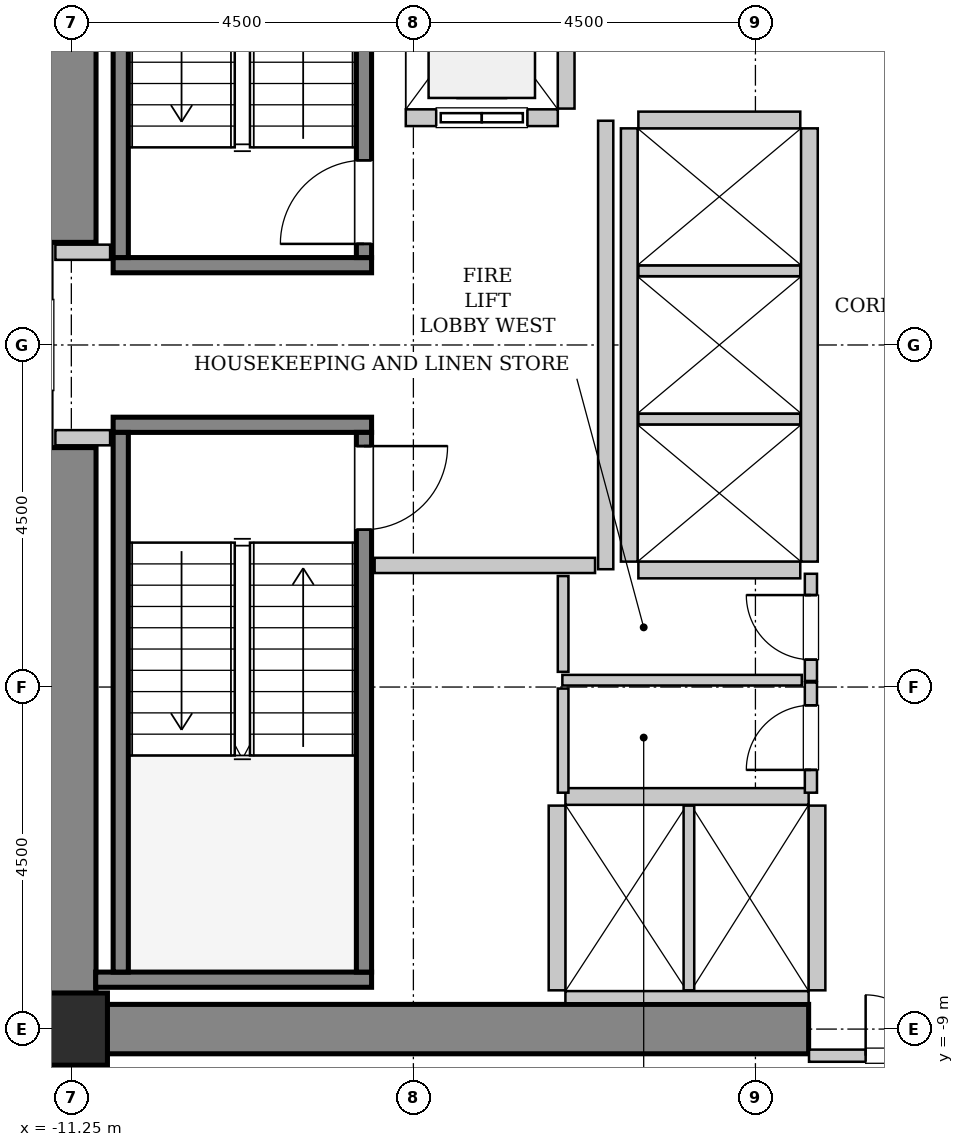
"""IFC4 building model, lengths in metres.
Left out: names, types, materials, properties, quantities, classifications, styles, units other than length and angle.
Written with IfcOpenShell. Run it as: python <this file> out.ifc"""

import sys

from ifc_helpers import new_model, si_unit, direction, frame, frame_2d, origin, origin_2d, place, context, subcontext, project, spatial, rectangle, hollow_rectangle, extrude, source, transform, mapped, element, fill, save


model = new_model("IFC4")
c1 = context("Model", 3, precision=1e-05, world=origin(), true_north=direction((0.0, 1.0)))
c2 = subcontext(c1, "Body", "Model", "MODEL_VIEW")
j1 = project(units=[si_unit("LENGTHUNIT", "METRE"), si_unit("PLANEANGLEUNIT", "RADIAN")], contexts=[c1])
p1 = place(None, origin())
s1 = spatial("IfcSite", under=j1, at=p1, CompositionType="ELEMENT")
p2 = place(p1, origin())
s2 = spatial("IfcBuilding", under=s1, at=p2, CompositionType="ELEMENT")
p3 = place(p2, frame((0.0, 0.0, 74.8)))
s3 = spatial("IfcBuildingStorey", under=s2, at=p3, CompositionType="ELEMENT", Elevation=74.8)
m1 = source(origin(), c2, "Body", "SweptSolid", [
    extrude(rectangle(XDim=10.025, YDim=0.65, at=frame_2d((5.012, 0.0))), origin(), (0.0, 0.0, 1.0), 3.8),
])
p4 = place(p3, frame((-11.575, -9.0, 0.0), z_axis=(0.0, 0.0, 1.0), x_axis=(1.0, 0.0, 0.0)))
e1 = element("IfcWall", 1, at=p4, inside=s3, PredefinedType="SHEAR", context=c2, shape_type="MappedRepresentation", body=[
    mapped(m1, transform((0.0, 0.0, 0.0), x_axis=(1.0, 0.0, 0.0), y_axis=(0.0, 1.0, 0.0), z_axis=(0.0, 0.0, 1.0), scale=1.0)),
])
m2 = source(origin(), c2, "Body", "SweptSolid", [
    extrude(rectangle(XDim=7.325, YDim=0.65, at=frame_2d((3.663, 0.0))), origin(), (0.0, 0.0, 1.0), 3.8),
])
for number, where, z_axis, x_axis in (
    (2, (-11.25, -8.675, 0.0), (0.0, 0.0, 1.0), (0.0, 1.0, 0.0)),
    (3, (-11.25, 1.35, 0.0), (0.0, 0.0, 1.0), (0.0, 1.0, 0.0)),
):
    element("IfcWall", number, at=place(p3, frame(where, z_axis=z_axis, x_axis=x_axis)), inside=s3, PredefinedType="SHEAR", context=c2, shape_type="MappedRepresentation", body=[
        mapped(m2, transform((0.0, 0.0, 0.0), x_axis=(1.0, 0.0, 0.0), y_axis=(0.0, 1.0, 0.0), z_axis=(0.0, 0.0, 1.0), scale=1.0)),
    ])
m3 = source(origin(), c2, "Body", "SweptSolid", [
    extrude(hollow_rectangle(XDim=0.95, YDim=0.95, WallThickness=0.045, InnerFilletRadius=0.045, OuterFilletRadius=0.09, at=origin_2d()), origin(), (0.0, 0.0, 1.0), 3.8),
])
p5 = place(p3, frame((-11.25, -9.0, 0.0), z_axis=(0.0, 0.0, 1.0), x_axis=(1.0, 0.0, 0.0)))
e4 = element("IfcColumn", 4, at=p5, inside=s3, PredefinedType="COLUMN", context=c2, shape_type="MappedRepresentation", body=[
    mapped(m3, transform((0.0, 0.0, 0.0), x_axis=(1.0, 0.0, 0.0), y_axis=(0.0, 1.0, 0.0), z_axis=(0.0, 0.0, 1.0), scale=1.0)),
])
m4 = source(origin(), c2, "Body", "SweptSolid", [
    extrude(rectangle(XDim=3.4, YDim=0.2, at=frame_2d((1.7, 0.0))), origin(), (0.0, 0.0, 1.0), 3.8),
])
p6 = place(p3, frame((-7.3, 1.05, 0.0), z_axis=(0.0, 0.0, 1.0), x_axis=(-1.0, 0.0, 0.0)))
e5 = element("IfcWall", 5, at=p6, inside=s3, PredefinedType="SOLIDWALL", context=c2, shape_type="MappedRepresentation", body=[
    mapped(m4, transform((0.0, 0.0, 0.0), x_axis=(1.0, 0.0, 0.0), y_axis=(0.0, 1.0, 0.0), z_axis=(0.0, 0.0, 1.0), scale=1.0)),
])
m5 = source(origin(), c2, "Body", "SweptSolid", [
    extrude(rectangle(XDim=7.1, YDim=0.2, at=frame_2d((3.55, 0.0))), origin(), (0.0, 0.0, 1.0), 3.8),
])
p7 = place(p3, frame((-7.4, 1.15, 0.0), z_axis=(0.0, 0.0, 1.0), x_axis=(0.0, 1.0, 0.0)))
e6 = element("IfcWall", 6, at=p7, inside=s3, PredefinedType="SOLIDWALL", context=c2, shape_type="MappedRepresentation", body=[
    mapped(m5, transform((0.0, 0.0, 0.0), x_axis=(1.0, 0.0, 0.0), y_axis=(0.0, 1.0, 0.0), z_axis=(0.0, 0.0, 1.0), scale=1.0)),
])
p8 = place(p7, frame((0.18, 0.0, 0.0)))
e7 = element("IfcOpeningElement", 7, at=p8, cuts=e6, PredefinedType="OPENING", context=c2, shape_type="SweptSolid", body=[
    extrude(rectangle(XDim=1.1, YDim=2.15, at=frame_2d((0.55, 1.075))), frame((0.0, 0.11, 0.0), z_axis=(0.0, -1.0, 0.0), x_axis=(1.0, 0.0, 0.0)), (0.0, 0.0, 1.0), 0.22),
])
p9 = place(p3, frame((-10.6, 1.15, 0.0), z_axis=(0.0, 0.0, 1.0), x_axis=(0.0, 1.0, 0.0)))
e8 = element("IfcWall", 8, at=p9, inside=s3, PredefinedType="SOLIDWALL", context=c2, shape_type="MappedRepresentation", body=[
    mapped(m5, transform((0.0, 0.0, 0.0), x_axis=(1.0, 0.0, 0.0), y_axis=(0.0, 1.0, 0.0), z_axis=(0.0, 0.0, 1.0), scale=1.0)),
])
p10 = place(p3, frame((-10.7, -1.05, 0.0), z_axis=(0.0, 0.0, 1.0), x_axis=(1.0, 0.0, 0.0)))
e9 = element("IfcWall", 9, at=p10, inside=s3, PredefinedType="SOLIDWALL", context=c2, shape_type="MappedRepresentation", body=[
    mapped(m4, transform((0.0, 0.0, 0.0), x_axis=(1.0, 0.0, 0.0), y_axis=(0.0, 1.0, 0.0), z_axis=(0.0, 0.0, 1.0), scale=1.0)),
])
m6 = source(origin(), c2, "Body", "SweptSolid", [
    extrude(rectangle(XDim=3.63, YDim=0.2, at=frame_2d((1.815, 0.0))), origin(), (0.0, 0.0, 1.0), 3.8),
])
p11 = place(p3, frame((-10.93, -8.35, 0.0), z_axis=(0.0, 0.0, 1.0), x_axis=(1.0, 0.0, 0.0)))
e10 = element("IfcWall", 10, at=p11, inside=s3, PredefinedType="SOLIDWALL", context=c2, shape_type="MappedRepresentation", body=[
    mapped(m6, transform((0.0, 0.0, 0.0), x_axis=(1.0, 0.0, 0.0), y_axis=(0.0, 1.0, 0.0), z_axis=(0.0, 0.0, 1.0), scale=1.0)),
])
p12 = place(p3, frame((-10.6, -1.15, 0.0), z_axis=(0.0, 0.0, 1.0), x_axis=(0.0, -1.0, 0.0)))
e11 = element("IfcWall", 11, at=p12, inside=s3, PredefinedType="SOLIDWALL", context=c2, shape_type="MappedRepresentation", body=[
    mapped(m5, transform((0.0, 0.0, 0.0), x_axis=(1.0, 0.0, 0.0), y_axis=(0.0, 1.0, 0.0), z_axis=(0.0, 0.0, 1.0), scale=1.0)),
])
p13 = place(p3, frame((-7.4, -1.15, 0.0), z_axis=(0.0, 0.0, 1.0), x_axis=(0.0, -1.0, 0.0)))
e12 = element("IfcWall", 12, at=p13, inside=s3, PredefinedType="SOLIDWALL", context=c2, shape_type="MappedRepresentation", body=[
    mapped(m5, transform((0.0, 0.0, 0.0), x_axis=(1.0, 0.0, 0.0), y_axis=(0.0, 1.0, 0.0), z_axis=(0.0, 0.0, 1.0), scale=1.0)),
])
p14 = place(p13, frame((0.18, 0.0, 0.0)))
e13 = element("IfcOpeningElement", 13, at=p14, cuts=e12, PredefinedType="OPENING", context=c2, shape_type="SweptSolid", body=[
    extrude(rectangle(XDim=1.1, YDim=2.15, at=frame_2d((0.55, 1.075))), frame((0.0, 0.11, 0.0), z_axis=(0.0, -1.0, 0.0), x_axis=(1.0, 0.0, 0.0)), (0.0, 0.0, 1.0), 0.22),
])
m7 = source(origin(), c2, "Body", "SweptSolid", [
    extrude(rectangle(XDim=2.0, YDim=0.22, at=frame_2d((1.0, 0.0))), origin(), (0.0, 0.0, 1.0), 3.535),
])
p15 = place(p3, frame((-6.85, 2.99, 0.0), z_axis=(0.0, 0.0, 1.0), x_axis=(1.0, 0.0, 0.0)))
e14 = element("IfcWall", 14, at=p15, inside=s3, PredefinedType="SOLIDWALL", context=c2, shape_type="MappedRepresentation", body=[
    mapped(m7, transform((0.0, 0.0, 0.0), x_axis=(1.0, 0.0, 0.0), y_axis=(0.0, 1.0, 0.0), z_axis=(0.0, 0.0, 1.0), scale=1.0)),
])
p16 = place(p15, frame((0.4, 0.0, 0.0)))
e15 = element("IfcOpeningElement", 15, at=p16, cuts=e14, PredefinedType="OPENING", context=c2, shape_type="SweptSolid", body=[
    extrude(rectangle(XDim=1.2, YDim=2.2, at=frame_2d((0.6, 1.1))), frame((0.0, 0.12, 0.0), z_axis=(0.0, -1.0, 0.0), x_axis=(1.0, 0.0, 0.0)), (0.0, 0.0, 1.0), 0.24),
])
m8 = source(origin(), c2, "Body", "SweptSolid", [
    extrude(rectangle(XDim=2.68, YDim=0.22, at=frame_2d((1.34, 0.0))), origin(), (0.0, 0.0, 1.0), 3.535),
])
p17 = place(p3, frame((-4.74, 3.11, 0.0), z_axis=(0.0, 0.0, 1.0), x_axis=(0.0, 1.0, 0.0)))
e16 = element("IfcWall", 16, at=p17, inside=s3, PredefinedType="SOLIDWALL", context=c2, shape_type="MappedRepresentation", body=[
    mapped(m8, transform((0.0, 0.0, 0.0), x_axis=(1.0, 0.0, 0.0), y_axis=(0.0, 1.0, 0.0), z_axis=(0.0, 0.0, 1.0), scale=1.0)),
])
m9 = source(origin(), c2, "Body", "SweptSolid", [
    extrude(rectangle(XDim=3.2, YDim=0.22, at=frame_2d((1.6, 0.0))), origin(), (0.0, 0.0, 1.0), 3.535),
])
p18 = place(p3, frame((-1.55, -5.94, 0.0), z_axis=(0.0, 0.0, 1.0), x_axis=(-1.0, 0.0, 0.0)))
e17 = element("IfcWall", 17, at=p18, inside=s3, PredefinedType="SOLIDWALL", context=c2, shape_type="MappedRepresentation", body=[
    mapped(m9, transform((0.0, 0.0, 0.0), x_axis=(1.0, 0.0, 0.0), y_axis=(0.0, 1.0, 0.0), z_axis=(0.0, 0.0, 1.0), scale=1.0)),
])
m10 = source(origin(), c2, "Body", "SweptSolid", [
    extrude(rectangle(XDim=3.2, YDim=0.16, at=frame_2d((1.6, 0.0))), origin(), (0.0, 0.0, 1.0), 2.425),
])
p19 = place(p3, frame((-4.75, -8.58, 0.0), z_axis=(0.0, 0.0, 1.0), x_axis=(1.0, 0.0, 0.0)))
e18 = element("IfcWall", 18, at=p19, inside=s3, PredefinedType="PARTITIONING", context=c2, shape_type="MappedRepresentation", body=[
    mapped(m10, transform((0.0, 0.0, 0.0), x_axis=(1.0, 0.0, 0.0), y_axis=(0.0, 1.0, 0.0), z_axis=(0.0, 0.0, 1.0), scale=1.0)),
])
m11 = source(origin(), c2, "Body", "SweptSolid", [
    extrude(rectangle(XDim=2.43, YDim=0.22, at=frame_2d((1.215, 0.0))), origin(), (0.0, 0.0, 1.0), 3.535),
])
p20 = place(p3, frame((-4.86, -6.06, 0.0), z_axis=(0.0, 0.0, 1.0), x_axis=(0.0, -1.0, 0.0)))
e19 = element("IfcWall", 19, at=p20, inside=s3, PredefinedType="SOLIDWALL", context=c2, shape_type="MappedRepresentation", body=[
    mapped(m11, transform((0.0, 0.0, 0.0), x_axis=(1.0, 0.0, 0.0), y_axis=(0.0, 1.0, 0.0), z_axis=(0.0, 0.0, 1.0), scale=1.0)),
])
m12 = source(origin(), c2, "Body", "SweptSolid", [
    extrude(rectangle(XDim=2.43, YDim=0.14, at=frame_2d((1.215, 0.0))), origin(), (0.0, 0.0, 1.0), 3.535),
])
p21 = place(p3, frame((-3.125, -8.49, 0.0), z_axis=(0.0, 0.0, 1.0), x_axis=(0.0, 1.0, 0.0)))
e20 = element("IfcWall", 20, at=p21, inside=s3, PredefinedType="PARTITIONING", context=c2, shape_type="MappedRepresentation", body=[
    mapped(m12, transform((0.0, 0.0, 0.0), x_axis=(1.0, 0.0, 0.0), y_axis=(0.0, 1.0, 0.0), z_axis=(0.0, 0.0, 1.0), scale=1.0)),
])
p22 = place(p3, frame((-1.44, -8.49, 0.0), z_axis=(0.0, 0.0, 1.0), x_axis=(0.0, 1.0, 0.0)))
e21 = element("IfcWall", 21, at=p22, inside=s3, PredefinedType="SOLIDWALL", context=c2, shape_type="MappedRepresentation", body=[
    mapped(m11, transform((0.0, 0.0, 0.0), x_axis=(1.0, 0.0, 0.0), y_axis=(0.0, 1.0, 0.0), z_axis=(0.0, 0.0, 1.0), scale=1.0)),
])
m13 = source(origin(), c2, "Body", "SweptSolid", [
    extrude(rectangle(XDim=5.7, YDim=0.22, at=frame_2d((2.85, 0.0))), origin(), (0.0, 0.0, 1.0), 3.535),
])
for number, where, z_axis, x_axis in (
    (22, (-1.54, -2.85, 0.0), (0.0, 0.0, 1.0), (0.0, 1.0, 0.0)),
    (23, (-3.91, 2.85, 0.0), (0.0, 0.0, 1.0), (0.0, -1.0, 0.0)),
):
    element("IfcWall", number, at=place(p3, frame(where, z_axis=z_axis, x_axis=x_axis)), inside=s3, PredefinedType="SOLIDWALL", context=c2, shape_type="MappedRepresentation", body=[
        mapped(m13, transform((0.0, 0.0, 0.0), x_axis=(1.0, 0.0, 0.0), y_axis=(0.0, 1.0, 0.0), z_axis=(0.0, 0.0, 1.0), scale=1.0)),
    ])
m14 = source(origin(), c2, "Body", "SweptSolid", [
    extrude(rectangle(XDim=2.13, YDim=0.22, at=frame_2d((1.065, 0.0))), origin(), (0.0, 0.0, 1.0), 3.535),
])
p23 = place(p3, frame((-3.79, -2.96, 0.0), z_axis=(0.0, 0.0, 1.0), x_axis=(1.0, 0.0, 0.0)))
e24 = element("IfcWall", 24, at=p23, inside=s3, PredefinedType="SOLIDWALL", context=c2, shape_type="MappedRepresentation", body=[
    mapped(m14, transform((0.0, 0.0, 0.0), x_axis=(1.0, 0.0, 0.0), y_axis=(0.0, 1.0, 0.0), z_axis=(0.0, 0.0, 1.0), scale=1.0)),
])
m15 = source(origin(), c2, "Body", "SweptSolid", [
    extrude(rectangle(XDim=2.13, YDim=0.14, at=frame_2d((1.065, 0.0))), origin(), (0.0, 0.0, 1.0), 3.535),
])
for number, where, z_axis, x_axis in (
    (25, (-3.79, -0.975, 0.0), (0.0, 0.0, 1.0), (1.0, 0.0, 0.0)),
    (26, (-3.79, 0.975, 0.0), (0.0, 0.0, 1.0), (1.0, 0.0, 0.0)),
):
    element("IfcWall", number, at=place(p3, frame(where, z_axis=z_axis, x_axis=x_axis)), inside=s3, PredefinedType="PARTITIONING", context=c2, shape_type="MappedRepresentation", body=[
        mapped(m15, transform((0.0, 0.0, 0.0), x_axis=(1.0, 0.0, 0.0), y_axis=(0.0, 1.0, 0.0), z_axis=(0.0, 0.0, 1.0), scale=1.0)),
    ])
p24 = place(p3, frame((-1.66, 2.96, 0.0), z_axis=(0.0, 0.0, 1.0), x_axis=(-1.0, 0.0, 0.0)))
e27 = element("IfcWall", 27, at=p24, inside=s3, PredefinedType="SOLIDWALL", context=c2, shape_type="MappedRepresentation", body=[
    mapped(m14, transform((0.0, 0.0, 0.0), x_axis=(1.0, 0.0, 0.0), y_axis=(0.0, 1.0, 0.0), z_axis=(0.0, 0.0, 1.0), scale=1.0)),
])
m16 = source(origin(), c2, "Body", "SweptSolid", [
    extrude(rectangle(XDim=5.9, YDim=0.2, at=frame_2d((2.95, 0.0))), origin(), (0.0, 0.0, 1.0), 3.535),
])
p25 = place(p3, frame((-4.22, -2.95, 0.0), z_axis=(0.0, 0.0, 1.0), x_axis=(0.0, 1.0, 0.0)))
e28 = element("IfcWall", 28, at=p25, inside=s3, PredefinedType="PARTITIONING", context=c2, shape_type="MappedRepresentation", body=[
    mapped(m16, transform((0.0, 0.0, 0.0), x_axis=(1.0, 0.0, 0.0), y_axis=(0.0, 1.0, 0.0), z_axis=(0.0, 0.0, 1.0), scale=1.0)),
])
m17 = source(origin(), c2, "Body", "SweptSolid", [
    extrude(rectangle(XDim=2.9, YDim=0.2, at=frame_2d((1.45, 0.0))), origin(), (0.0, 0.0, 1.0), 3.535),
])
p26 = place(p3, frame((-7.26, -2.9, 0.0), z_axis=(0.0, 0.0, 1.0), x_axis=(1.0, 0.0, 0.0)))
e29 = element("IfcWall", 29, at=p26, inside=s3, PredefinedType="PARTITIONING", context=c2, shape_type="MappedRepresentation", body=[
    mapped(m17, transform((0.0, 0.0, 0.0), x_axis=(1.0, 0.0, 0.0), y_axis=(0.0, 1.0, 0.0), z_axis=(0.0, 0.0, 1.0), scale=1.0)),
])
m18 = source(origin(), c2, "Body", "SweptSolid", [
    extrude(rectangle(XDim=0.72, YDim=0.2, at=frame_2d((0.36, 0.0))), origin(), (0.0, 0.0, 1.0), 3.535),
])
for number, where, z_axis, x_axis in (
    (30, (-11.46, 1.22, 0.0), (0.0, 0.0, 1.0), (1.0, 0.0, 0.0)),
    (31, (-11.46, -1.22, 0.0), (0.0, 0.0, 1.0), (1.0, 0.0, 0.0)),
):
    element("IfcWall", number, at=place(p3, frame(where, z_axis=z_axis, x_axis=x_axis)), inside=s3, PredefinedType="PARTITIONING", context=c2, shape_type="MappedRepresentation", body=[
        mapped(m18, transform((0.0, 0.0, 0.0), x_axis=(1.0, 0.0, 0.0), y_axis=(0.0, 1.0, 0.0), z_axis=(0.0, 0.0, 1.0), scale=1.0)),
    ])
m19 = source(origin(), c2, "Body", "SweptSolid", [
    extrude(rectangle(XDim=3.09, YDim=0.16, at=frame_2d((1.545, 0.0))), origin(), (0.0, 0.0, 1.0), 2.425),
])
p27 = place(p3, frame((-1.545, -9.35, 0.0), z_axis=(0.0, 0.0, 1.0), x_axis=(1.0, 0.0, 0.0)))
e32 = element("IfcWall", 32, at=p27, inside=s3, PredefinedType="PARTITIONING", context=c2, shape_type="MappedRepresentation", body=[
    mapped(m19, transform((0.0, 0.0, 0.0), x_axis=(1.0, 0.0, 0.0), y_axis=(0.0, 1.0, 0.0), z_axis=(0.0, 0.0, 1.0), scale=1.0)),
])
p28 = place(p27, frame((0.745, 0.0, 0.0)))
e33 = element("IfcOpeningElement", 33, at=p28, cuts=e32, PredefinedType="OPENING", context=c2, shape_type="SweptSolid", body=[
    extrude(rectangle(XDim=1.6, YDim=2.3, at=frame_2d((0.8, 1.15))), frame((0.0, 0.09, 0.0), z_axis=(0.0, -1.0, 0.0), x_axis=(1.0, 0.0, 0.0)), (0.0, 0.0, 1.0), 0.18),
])
m20 = source(origin(), c2, "Body", "SweptSolid", [
    extrude(rectangle(XDim=1.41, YDim=0.16, at=frame_2d((0.705, 0.0))), origin(), (0.0, 0.0, 1.0), 3.535),
])
p29 = place(p3, frame((-1.52, -4.42, 0.0), z_axis=(0.0, 0.0, 1.0), x_axis=(0.0, 1.0, 0.0)))
e34 = element("IfcWall", 34, at=p29, inside=s3, PredefinedType="PARTITIONING", context=c2, shape_type="MappedRepresentation", body=[
    mapped(m20, transform((0.0, 0.0, 0.0), x_axis=(1.0, 0.0, 0.0), y_axis=(0.0, 1.0, 0.0), z_axis=(0.0, 0.0, 1.0), scale=1.0)),
])
p30 = place(p29, frame((0.28, 0.0, 0.0)))
e35 = element("IfcOpeningElement", 35, at=p30, cuts=e34, PredefinedType="OPENING", context=c2, shape_type="SweptSolid", body=[
    extrude(rectangle(XDim=0.85, YDim=2.1, at=frame_2d((0.425, 1.05))), frame((0.0, 0.09, 0.0), z_axis=(0.0, -1.0, 0.0), x_axis=(1.0, 0.0, 0.0)), (0.0, 0.0, 1.0), 0.18),
])
m21 = source(origin(), c2, "Body", "SweptSolid", [
    extrude(rectangle(XDim=3.15, YDim=0.14, at=frame_2d((1.575, 0.0))), origin(), (0.0, 0.0, 1.0), 3.535),
])
p31 = place(p3, frame((-4.79, -4.41, 0.0), z_axis=(0.0, 0.0, 1.0), x_axis=(1.0, 0.0, 0.0)))
e36 = element("IfcWall", 36, at=p31, inside=s3, PredefinedType="PARTITIONING", context=c2, shape_type="MappedRepresentation", body=[
    mapped(m21, transform((0.0, 0.0, 0.0), x_axis=(1.0, 0.0, 0.0), y_axis=(0.0, 1.0, 0.0), z_axis=(0.0, 0.0, 1.0), scale=1.0)),
])
m22 = source(origin(), c2, "Body", "SweptSolid", [
    extrude(rectangle(XDim=1.26, YDim=0.14, at=frame_2d((0.63, 0.0))), origin(), (0.0, 0.0, 1.0), 3.535),
])
p32 = place(p3, frame((-4.78, -4.3, 0.0), z_axis=(0.0, 0.0, 1.0), x_axis=(0.0, 1.0, 0.0)))
e37 = element("IfcWall", 37, at=p32, inside=s3, PredefinedType="PARTITIONING", context=c2, shape_type="MappedRepresentation", body=[
    mapped(m22, transform((0.0, 0.0, 0.0), x_axis=(1.0, 0.0, 0.0), y_axis=(0.0, 1.0, 0.0), z_axis=(0.0, 0.0, 1.0), scale=1.0)),
])
m23 = source(origin(), c2, "Body", "SweptSolid", [
    extrude(rectangle(XDim=1.45, YDim=0.16, at=frame_2d((0.725, 0.0))), origin(), (0.0, 0.0, 1.0), 3.535),
])
p33 = place(p3, frame((-1.52, -5.89, 0.0), z_axis=(0.0, 0.0, 1.0), x_axis=(0.0, 1.0, 0.0)))
e38 = element("IfcWall", 38, at=p33, inside=s3, PredefinedType="PARTITIONING", context=c2, shape_type="MappedRepresentation", body=[
    mapped(m23, transform((0.0, 0.0, 0.0), x_axis=(1.0, 0.0, 0.0), y_axis=(0.0, 1.0, 0.0), z_axis=(0.0, 0.0, 1.0), scale=1.0)),
])
p34 = place(p33, frame((0.3, 0.0, 0.0)))
e39 = element("IfcOpeningElement", 39, at=p34, cuts=e38, PredefinedType="OPENING", context=c2, shape_type="SweptSolid", body=[
    extrude(rectangle(XDim=0.85, YDim=2.1, at=frame_2d((0.425, 1.05))), frame((0.0, 0.09, 0.0), z_axis=(0.0, -1.0, 0.0), x_axis=(1.0, 0.0, 0.0)), (0.0, 0.0, 1.0), 0.18),
])
m24 = source(origin(), c2, "Body", "SweptSolid", [
    extrude(rectangle(XDim=1.37, YDim=0.14, at=frame_2d((0.685, 0.0))), origin(), (0.0, 0.0, 1.0), 3.535),
])
p35 = place(p3, frame((-4.78, -5.89, 0.0), z_axis=(0.0, 0.0, 1.0), x_axis=(0.0, 1.0, 0.0)))
e40 = element("IfcWall", 40, at=p35, inside=s3, PredefinedType="PARTITIONING", context=c2, shape_type="MappedRepresentation", body=[
    mapped(m24, transform((0.0, 0.0, 0.0), x_axis=(1.0, 0.0, 0.0), y_axis=(0.0, 1.0, 0.0), z_axis=(0.0, 0.0, 1.0), scale=1.0)),
])
m25 = source(origin(), c2, "Body", "SweptSolid", [
    extrude(rectangle(XDim=1.1, YDim=2.15, at=frame_2d((0.55, 1.075))), frame((0.0, 0.025, 0.0), z_axis=(0.0, -1.0, 0.0), x_axis=(1.0, 0.0, 0.0)), (0.0, 0.0, 1.0), 0.05),
])
p36 = place(p8, origin())
e41 = element("IfcDoor", 41, at=p36, inside=s3, OperationType="SINGLE_SWING_LEFT", PredefinedType="DOOR", context=c2, shape_type="MappedRepresentation", body=[
    mapped(m25, transform((0.0, 0.0, 0.0), x_axis=(1.0, 0.0, 0.0), y_axis=(0.0, 1.0, 0.0), z_axis=(0.0, 0.0, 1.0), scale=1.0)),
])
fill(e7, e41)
p37 = place(p14, origin())
e42 = element("IfcDoor", 42, at=p37, inside=s3, OperationType="SINGLE_SWING_LEFT", PredefinedType="DOOR", context=c2, shape_type="MappedRepresentation", body=[
    mapped(m25, transform((0.0, 0.0, 0.0), x_axis=(1.0, 0.0, 0.0), y_axis=(0.0, 1.0, 0.0), z_axis=(0.0, 0.0, 1.0), scale=1.0)),
])
fill(e13, e42)
m26 = source(origin(), c2, "Body", "SweptSolid", [
    extrude(rectangle(XDim=1.2, YDim=2.2, at=frame_2d((0.6, 1.1))), frame((0.0, 0.025, 0.0), z_axis=(0.0, -1.0, 0.0), x_axis=(1.0, 0.0, 0.0)), (0.0, 0.0, 1.0), 0.05),
])
p38 = place(p16, origin())
e43 = element("IfcDoor", 43, at=p38, inside=s3, OperationType="SLIDING_TO_LEFT", PredefinedType="DOOR", context=c2, shape_type="MappedRepresentation", body=[
    mapped(m26, transform((0.0, 0.0, 0.0), x_axis=(1.0, 0.0, 0.0), y_axis=(0.0, 1.0, 0.0), z_axis=(0.0, 0.0, 1.0), scale=1.0)),
])
fill(e15, e43)
m27 = source(origin(), c2, "Body", "SweptSolid", [
    extrude(rectangle(XDim=1.6, YDim=2.3, at=frame_2d((0.8, 1.15))), frame((0.0, 0.025, 0.0), z_axis=(0.0, -1.0, 0.0), x_axis=(1.0, 0.0, 0.0)), (0.0, 0.0, 1.0), 0.05),
])
p39 = place(p28, origin())
e44 = element("IfcDoor", 44, at=p39, inside=s3, OperationType="DOUBLE_DOOR_SINGLE_SWING", PredefinedType="DOOR", context=c2, shape_type="MappedRepresentation", body=[
    mapped(m27, transform((0.0, 0.0, 0.0), x_axis=(1.0, 0.0, 0.0), y_axis=(0.0, 1.0, 0.0), z_axis=(0.0, 0.0, 1.0), scale=1.0)),
])
fill(e33, e44)
m28 = source(origin(), c2, "Body", "SweptSolid", [
    extrude(rectangle(XDim=0.85, YDim=2.1, at=frame_2d((0.425, 1.05))), frame((0.0, 0.025, 0.0), z_axis=(0.0, -1.0, 0.0), x_axis=(1.0, 0.0, 0.0)), (0.0, 0.0, 1.0), 0.05),
])
p40 = place(p30, origin())
e45 = element("IfcDoor", 45, at=p40, inside=s3, OperationType="SINGLE_SWING_RIGHT", PredefinedType="DOOR", context=c2, shape_type="MappedRepresentation", body=[
    mapped(m28, transform((0.0, 0.0, 0.0), x_axis=(1.0, 0.0, 0.0), y_axis=(0.0, 1.0, 0.0), z_axis=(0.0, 0.0, 1.0), scale=1.0)),
])
fill(e35, e45)
p41 = place(p34, origin())
e46 = element("IfcDoor", 46, at=p41, inside=s3, OperationType="SINGLE_SWING_LEFT", PredefinedType="DOOR", context=c2, shape_type="MappedRepresentation", body=[
    mapped(m28, transform((0.0, 0.0, 0.0), x_axis=(1.0, 0.0, 0.0), y_axis=(0.0, 1.0, 0.0), z_axis=(0.0, 0.0, 1.0), scale=1.0)),
])
fill(e39, e46)
save(model, sys.argv[1])
